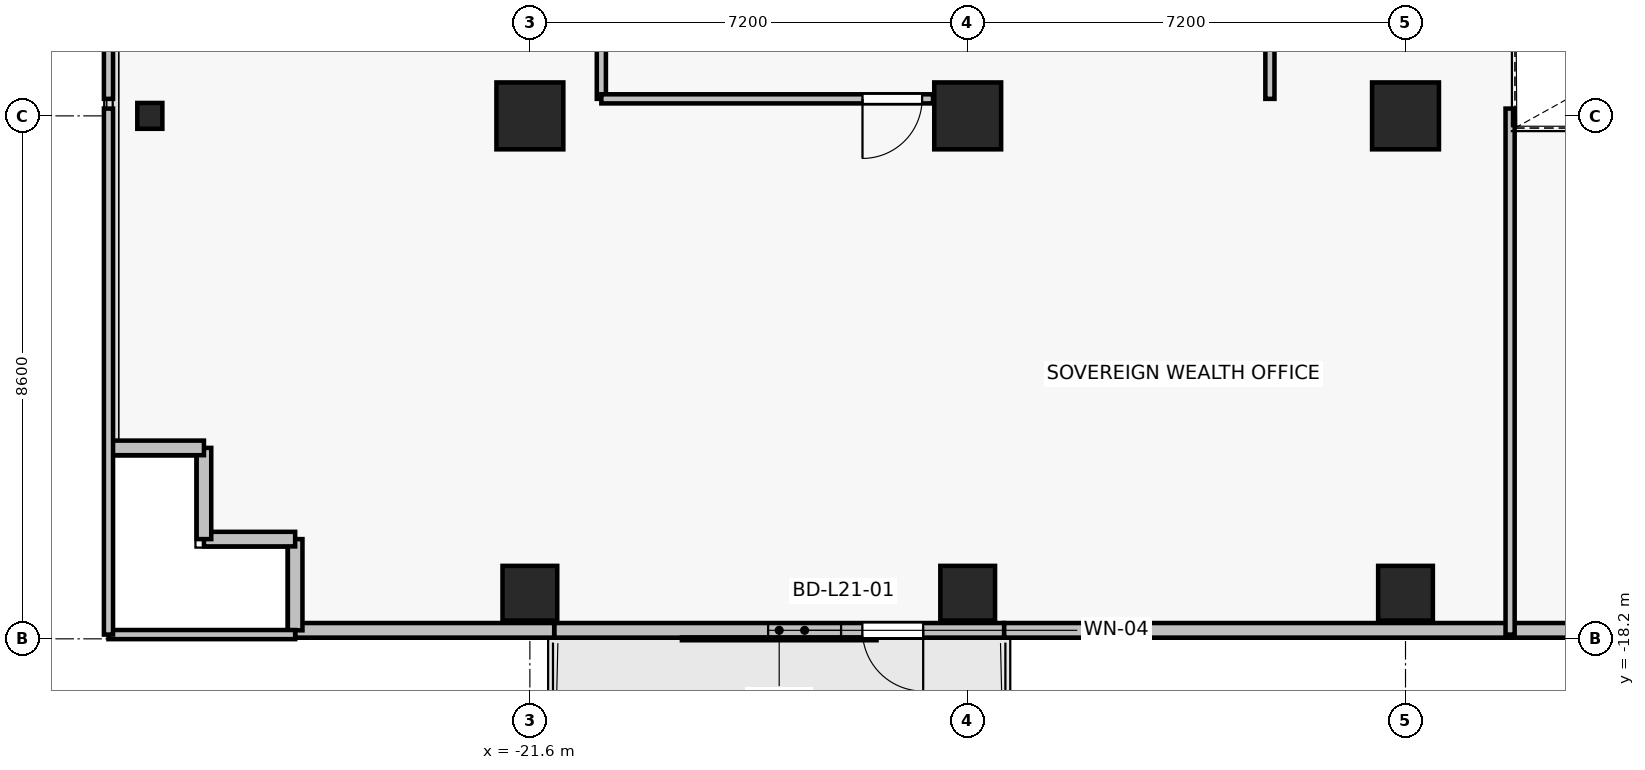
"""IFC4 building model, lengths in metres.
Left out: names, types, materials, properties, quantities, classifications, styles, units other than length and angle.
Written with IfcOpenShell. Run it as: python <this file> out.ifc"""

import sys

from ifc_helpers import new_model, si_unit, direction, frame, frame_2d, origin, origin_2d, place, context, subcontext, project, spatial, rectangle, i_section, extrude, source, transform, mapped, element, fill, save


model = new_model("IFC4")
c1 = context("Model", 3, precision=1e-05, world=origin(), true_north=direction((0.0, 1.0)))
c2 = subcontext(c1, "Body", "Model", "MODEL_VIEW")
j1 = project(units=[si_unit("LENGTHUNIT", "METRE"), si_unit("PLANEANGLEUNIT", "RADIAN")], contexts=[c1])
p1 = place(None, origin())
s1 = spatial("IfcSite", under=j1, at=p1, CompositionType="ELEMENT")
p2 = place(p1, origin())
s2 = spatial("IfcBuilding", under=s1, at=p2, CompositionType="ELEMENT")
p3 = place(p2, frame((0.0, 0.0, 76.9)))
s3 = spatial("IfcBuildingStorey", under=s2, at=p3, CompositionType="ELEMENT", Elevation=76.9)
for number, where, z_axis, x_axis in (
    (1, (-14.4, -9.6, 0.0), (0.0, 0.0, 1.0), (1.0, 0.0, 0.0)),
    (2, (-7.2, -9.6, 0.0), (0.0, 0.0, 1.0), (1.0, 0.0, 0.0)),
    (3, (-21.6, -9.6, 0.0), (0.0, 0.0, 1.0), (1.0, 0.0, 0.0)),
):
    element("IfcColumn", number, at=place(p3, frame(where, z_axis=z_axis, x_axis=x_axis)), inside=s3, PredefinedType="COLUMN", context=c2, shape_type="SweptSolid", body=[
        extrude(rectangle(XDim=1.1, YDim=1.1, at=origin_2d()), origin(), (0.0, 0.0, 1.0), 3.3),
    ])
for number, where, z_axis, x_axis in (
    (4, (-14.4, -17.45, 0.0), (0.0, 0.0, 1.0), (1.0, 0.0, 0.0)),
    (5, (-7.2, -17.45, 0.0), (0.0, 0.0, 1.0), (1.0, 0.0, 0.0)),
    (6, (-21.6, -17.45, 0.0), (0.0, 0.0, 1.0), (1.0, 0.0, 0.0)),
):
    element("IfcColumn", number, at=place(p3, frame(where, z_axis=z_axis, x_axis=x_axis)), inside=s3, PredefinedType="COLUMN", context=c2, shape_type="SweptSolid", body=[
        extrude(rectangle(XDim=0.9, YDim=0.9, at=origin_2d()), origin(), (0.0, 0.0, 1.0), 3.3),
    ])
p4 = place(p3, frame((-27.85, -9.6, 0.0), z_axis=(0.0, 0.0, 1.0), x_axis=(1.0, 0.0, 0.0)))
e7 = element("IfcColumn", 7, at=p4, inside=s3, PredefinedType="COLUMN", context=c2, shape_type="SweptSolid", body=[
    extrude(i_section(OverallWidth=0.412, OverallDepth=0.425, WebThickness=0.026, FlangeThickness=0.039, FilletRadius=0.015, at=origin_2d()), origin(), (0.0, 0.0, 1.0), 3.3),
])
p5 = place(p3, frame((-13.8, -18.06, 0.0), z_axis=(0.0, 0.0, 1.0), x_axis=(-1.0, 0.0, 0.0)))
e8 = element("IfcWall", 8, at=p5, inside=s3, PredefinedType="SOLIDWALL", context=c2, shape_type="SweptSolid", body=[
    extrude(rectangle(XDim=7.4, YDim=0.24, at=frame_2d((3.7, 0.0))), origin(), (0.0, 0.0, 1.0), 3.05),
])
p6 = place(p5, frame((1.332, 0.0, 0.0)))
e9 = element("IfcOpeningElement", 9, at=p6, cuts=e8, PredefinedType="OPENING", context=c2, shape_type="SweptSolid", body=[
    extrude(rectangle(XDim=1.0, YDim=2.2, at=frame_2d((0.5, 1.1))), frame((0.0, 0.13, 0.0), z_axis=(0.0, -1.0, 0.0), x_axis=(1.0, 0.0, 0.0)), (0.0, 0.0, 1.0), 0.26),
])
p7 = place(p5, frame((2.682, 0.0, 0.85)))
e10 = element("IfcOpeningElement", 10, at=p7, cuts=e8, PredefinedType="OPENING", context=c2, shape_type="SweptSolid", body=[
    extrude(rectangle(XDim=1.2, YDim=1.5, at=frame_2d((0.6, 0.75))), frame((0.0, 0.13, 0.0), z_axis=(0.0, -1.0, 0.0), x_axis=(1.0, 0.0, 0.0)), (0.0, 0.0, 1.0), 0.26),
])
p8 = place(p3, frame((-13.8, -18.06, 0.0), z_axis=(0.0, 0.0, 1.0), x_axis=(1.0, 0.0, 0.0)))
e11 = element("IfcWall", 11, at=p8, inside=s3, PredefinedType="SOLIDWALL", context=c2, shape_type="SweptSolid", body=[
    extrude(rectangle(XDim=10.46, YDim=0.24, at=frame_2d((5.23, 0.0))), origin(), (0.0, 0.0, 1.0), 3.05),
])
p9 = place(p3, frame((-25.46, -18.06, 0.0), z_axis=(0.0, 0.0, 1.0), x_axis=(1.0, 0.0, 0.0)))
e12 = element("IfcWall", 12, at=p9, inside=s3, PredefinedType="SOLIDWALL", context=c2, shape_type="SweptSolid", body=[
    extrude(rectangle(XDim=4.26, YDim=0.24, at=frame_2d((2.13, 0.0))), origin(), (0.0, 0.0, 1.0), 3.05),
])
for number, where, z_axis, x_axis in (
    (13, (-25.46, -16.56, 0.0), (0.0, 0.0, 1.0), (0.0, -1.0, 0.0)),
    (14, (-26.96, -16.56, 0.0), (0.0, 0.0, 1.0), (1.0, 0.0, 0.0)),
    (15, (-26.96, -15.06, 0.0), (0.0, 0.0, 1.0), (0.0, -1.0, 0.0)),
    (16, (-28.46, -15.06, 0.0), (0.0, 0.0, 1.0), (1.0, 0.0, 0.0)),
):
    element("IfcWall", number, at=place(p3, frame(where, z_axis=z_axis, x_axis=x_axis)), inside=s3, PredefinedType="SOLIDWALL", context=c2, shape_type="SweptSolid", body=[
        extrude(rectangle(XDim=1.5, YDim=0.24, at=frame_2d((0.75, 0.0))), origin(), (0.0, 0.0, 1.0), 3.05),
    ])
p10 = place(p3, frame((-28.53, -9.32, 0.0), z_axis=(0.0, 0.0, 1.0), x_axis=(0.0, 1.0, 0.0)))
e17 = element("IfcWall", 17, at=p10, inside=s3, PredefinedType="PARTITIONING", context=c2, shape_type="SweptSolid", body=[
    extrude(rectangle(XDim=5.49, YDim=0.15, at=frame_2d((2.745, 0.0))), origin(), (0.0, 0.0, 1.0), 3.05),
])
p11 = place(p3, frame((-20.425, -3.83, 0.0), z_axis=(0.0, 0.0, 1.0), x_axis=(0.0, -1.0, 0.0)))
e18 = element("IfcWall", 18, at=p11, inside=s3, PredefinedType="PARTITIONING", context=c2, shape_type="SweptSolid", body=[
    extrude(rectangle(XDim=5.49, YDim=0.15, at=frame_2d((2.745, 0.0))), origin(), (0.0, 0.0, 1.0), 2.44),
])
p12 = place(p3, frame((-14.97, -9.32, 0.0), z_axis=(0.0, 0.0, 1.0), x_axis=(-1.0, 0.0, 0.0)))
e19 = element("IfcWall", 19, at=p12, inside=s3, PredefinedType="PARTITIONING", context=c2, shape_type="SweptSolid", body=[
    extrude(rectangle(XDim=5.455, YDim=0.15, at=frame_2d((2.727, 0.0))), origin(), (0.0, 0.0, 1.0), 2.44),
])
p13 = place(p12, frame((0.18, 0.0, 0.0)))
e20 = element("IfcOpeningElement", 20, at=p13, cuts=e19, PredefinedType="OPENING", context=c2, shape_type="SweptSolid", body=[
    extrude(rectangle(XDim=0.98, YDim=2.15, at=frame_2d((0.49, 1.075))), frame((0.0, 0.085, 0.0), z_axis=(0.0, -1.0, 0.0), x_axis=(1.0, 0.0, 0.0)), (0.0, 0.0, 1.0), 0.17),
])
p14 = place(p3, frame((-9.43, -3.83, 0.0), z_axis=(0.0, 0.0, 1.0), x_axis=(0.0, -1.0, 0.0)))
e21 = element("IfcWall", 21, at=p14, inside=s3, PredefinedType="PARTITIONING", context=c2, shape_type="SweptSolid", body=[
    extrude(rectangle(XDim=5.49, YDim=0.15, at=frame_2d((2.745, 0.0))), origin(), (0.0, 0.0, 1.0), 2.44),
])
p15 = place(p3, frame((-25.46, -18.13, 0.0), z_axis=(0.0, 0.0, 1.0), x_axis=(-1.0, 0.0, 0.0)))
e22 = element("IfcWall", 22, at=p15, inside=s3, PredefinedType="PARTITIONING", context=c2, shape_type="SweptSolid", body=[
    extrude(rectangle(XDim=3.07, YDim=0.15, at=frame_2d((1.535, 0.0))), origin(), (0.0, 0.0, 1.0), 3.05),
])
p16 = place(p3, frame((-28.53, -18.13, 0.0), z_axis=(0.0, 0.0, 1.0), x_axis=(0.0, 1.0, 0.0)))
e23 = element("IfcWall", 23, at=p16, inside=s3, PredefinedType="PARTITIONING", context=c2, shape_type="SweptSolid", body=[
    extrude(rectangle(XDim=8.65, YDim=0.15, at=frame_2d((4.325, 0.0))), origin(), (0.0, 0.0, 1.0), 3.05),
])
p17 = place(p3, frame((-5.48, -9.48, 0.0), z_axis=(0.0, 0.0, 1.0), x_axis=(0.0, -1.0, 0.0)))
e24 = element("IfcWall", 24, at=p17, inside=s3, PredefinedType="PARTITIONING", context=c2, shape_type="SweptSolid", body=[
    extrude(rectangle(XDim=8.65, YDim=0.15, at=frame_2d((4.325, 0.0))), origin(), (0.0, 0.0, 1.0), 2.44),
])
m1 = source(origin(), c2, "Body", "SweptSolid", [
    extrude(rectangle(XDim=1.0, YDim=2.2, at=frame_2d((0.5, 1.1))), frame((0.0, 0.025, 0.0), z_axis=(0.0, -1.0, 0.0), x_axis=(1.0, 0.0, 0.0)), (0.0, 0.0, 1.0), 0.05),
])
p18 = place(p6, origin())
e25 = element("IfcDoor", 25, at=p18, inside=s3, OperationType="SINGLE_SWING_LEFT", PredefinedType="DOOR", context=c2, shape_type="MappedRepresentation", body=[
    mapped(m1, transform((0.0, 0.0, 0.0), x_axis=(1.0, 0.0, 0.0), y_axis=(0.0, 1.0, 0.0), z_axis=(0.0, 0.0, 1.0), scale=1.0)),
])
fill(e9, e25)
m2 = source(origin(), c2, "Body", "SweptSolid", [
    extrude(rectangle(XDim=1.2, YDim=1.5, at=frame_2d((0.6, 0.75))), frame((0.0, 0.03, 0.0), z_axis=(0.0, -1.0, 0.0), x_axis=(1.0, 0.0, 0.0)), (0.0, 0.0, 1.0), 0.06),
])
p19 = place(p7, origin())
e26 = element("IfcWindow", 26, at=p19, inside=s3, PartitioningType="SINGLE_PANEL", PredefinedType="WINDOW", context=c2, shape_type="MappedRepresentation", body=[
    mapped(m2, transform((0.0, 0.0, 0.0), x_axis=(1.0, 0.0, 0.0), y_axis=(0.0, 1.0, 0.0), z_axis=(0.0, 0.0, 1.0), scale=1.0)),
])
fill(e10, e26)
m3 = source(origin(), c2, "Body", "SweptSolid", [
    extrude(rectangle(XDim=0.98, YDim=2.15, at=frame_2d((0.49, 1.075))), frame((0.0, 0.025, 0.0), z_axis=(0.0, -1.0, 0.0), x_axis=(1.0, 0.0, 0.0)), (0.0, 0.0, 1.0), 0.05),
])
p20 = place(p13, origin())
e27 = element("IfcDoor", 27, at=p20, inside=s3, OperationType="SINGLE_SWING_RIGHT", PredefinedType="DOOR", context=c2, shape_type="MappedRepresentation", body=[
    mapped(m3, transform((0.0, 0.0, 0.0), x_axis=(1.0, 0.0, 0.0), y_axis=(0.0, 1.0, 0.0), z_axis=(0.0, 0.0, 1.0), scale=1.0)),
])
fill(e20, e27)
save(model, sys.argv[1])
